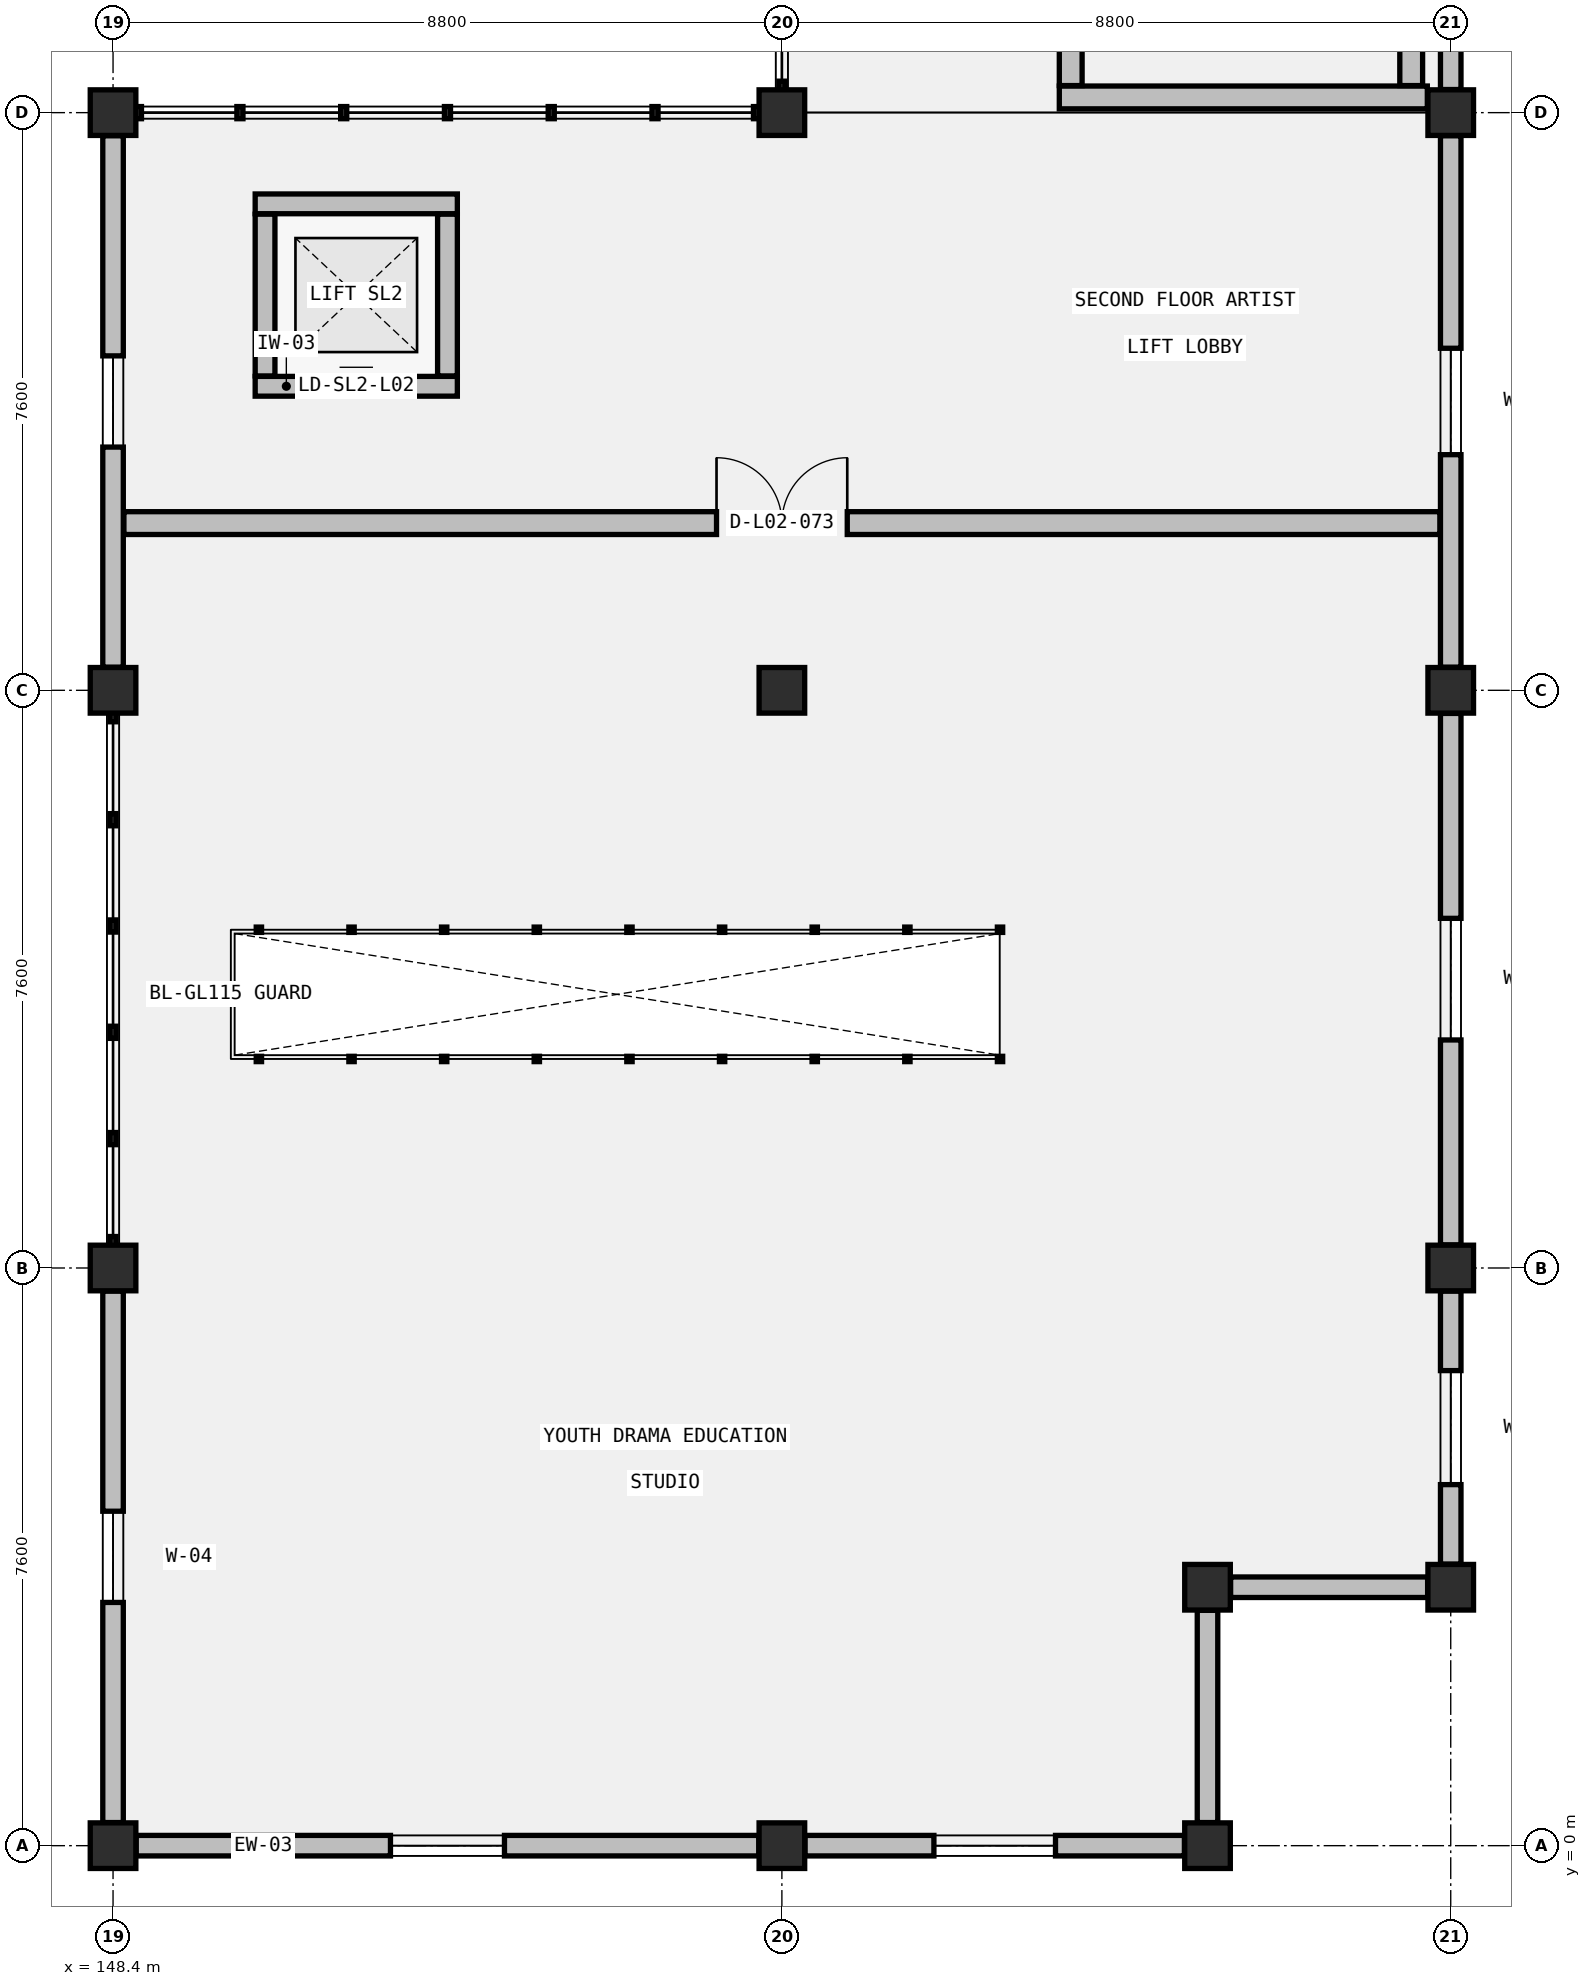
"""IFC4 building model, lengths in metres.
Left out: names, types, materials, properties, quantities, classifications, styles, units other than length and angle.
Written with IfcOpenShell. Run it as: python <this file> out.ifc"""

import sys

from ifc_helpers import new_model, si_unit, direction, frame, frame_2d, origin, origin_2d, place, context, subcontext, project, spatial, rectangle, extrude, element, fill, save


model = new_model("IFC4")
c1 = context("Model", 3, precision=1e-05, world=origin(), true_north=direction((0.0, 1.0)))
c2 = subcontext(c1, "Body", "Model", "MODEL_VIEW")
j1 = project(units=[si_unit("LENGTHUNIT", "METRE"), si_unit("PLANEANGLEUNIT", "RADIAN")], contexts=[c1])
p1 = place(None, origin())
s1 = spatial("IfcSite", under=j1, at=p1, CompositionType="ELEMENT")
p2 = place(p1, origin())
s2 = spatial("IfcBuilding", under=s1, at=p2, CompositionType="ELEMENT")
p3 = place(p2, frame((0.0, 0.0, 10.0)))
s3 = spatial("IfcBuildingStorey", under=s2, at=p3, CompositionType="ELEMENT", Elevation=10.0)
for number, where, z_axis, x_axis in (
    (1, (148.4, 0.0, 0.0), (0.0, 0.0, 1.0), (1.0, 0.0, 0.0)),
    (2, (148.4, 7.6, 0.0), (0.0, 0.0, 1.0), (1.0, 0.0, 0.0)),
    (3, (148.4, 15.2, 0.0), (0.0, 0.0, 1.0), (1.0, 0.0, 0.0)),
    (4, (148.4, 22.8, 0.0), (0.0, 0.0, 1.0), (1.0, 0.0, 0.0)),
    (5, (157.2, 0.0, 0.0), (0.0, 0.0, 1.0), (1.0, 0.0, 0.0)),
    (6, (157.2, 15.2, 0.0), (0.0, 0.0, 1.0), (1.0, 0.0, 0.0)),
    (7, (157.2, 22.8, 0.0), (0.0, 0.0, 1.0), (1.0, 0.0, 0.0)),
    (8, (166.0, 7.6, 0.0), (0.0, 0.0, 1.0), (1.0, 0.0, 0.0)),
    (9, (166.0, 15.2, 0.0), (0.0, 0.0, 1.0), (1.0, 0.0, 0.0)),
    (10, (166.0, 22.8, 0.0), (0.0, 0.0, 1.0), (1.0, 0.0, 0.0)),
    (11, (162.8, 0.0, 0.0), (0.0, 0.0, 1.0), (1.0, 0.0, 0.0)),
    (12, (162.8, 3.4, 0.0), (0.0, 0.0, 1.0), (1.0, 0.0, 0.0)),
    (13, (166.0, 3.4, 0.0), (0.0, 0.0, 1.0), (1.0, 0.0, 0.0)),
):
    element("IfcColumn", number, at=place(p3, frame(where, z_axis=z_axis, x_axis=x_axis)), inside=s3, PredefinedType="COLUMN", context=c2, shape_type="SweptSolid", body=[
        extrude(rectangle(XDim=0.6, YDim=0.6, at=origin_2d()), origin(), (0.0, 0.0, 1.0), 4.6),
    ])
p4 = place(p3, frame((166.0, 3.704, 0.0), z_axis=(0.0, 0.0, 1.0), x_axis=(0.0, 1.0, 0.0)))
e14 = element("IfcWall", 14, at=p4, inside=s3, PredefinedType="STANDARD", context=c2, shape_type="SweptSolid", body=[
    extrude(rectangle(XDim=3.592, YDim=0.27, at=frame_2d((1.796, 0.0))), origin(), (0.0, 0.0, 1.0), 4.034),
])
p5 = place(p4, frame((1.046, 0.0, 0.9)))
e15 = element("IfcOpeningElement", 15, at=p5, cuts=e14, PredefinedType="OPENING", context=c2, shape_type="SweptSolid", body=[
    extrude(rectangle(XDim=1.5, YDim=2.15, at=frame_2d((0.75, 1.075))), frame((0.0, 0.145, 0.0), z_axis=(0.0, -1.0, 0.0), x_axis=(1.0, 0.0, 0.0)), (0.0, 0.0, 1.0), 0.29),
])
p6 = place(p3, frame((166.0, 7.904, 0.0), z_axis=(0.0, 0.0, 1.0), x_axis=(0.0, 1.0, 0.0)))
e16 = element("IfcWall", 16, at=p6, inside=s3, PredefinedType="STANDARD", context=c2, shape_type="SweptSolid", body=[
    extrude(rectangle(XDim=6.992, YDim=0.27, at=frame_2d((3.496, 0.0))), origin(), (0.0, 0.0, 1.0), 4.034),
])
p7 = place(p6, frame((2.696, 0.0, 0.9)))
e17 = element("IfcOpeningElement", 17, at=p7, cuts=e16, PredefinedType="OPENING", context=c2, shape_type="SweptSolid", body=[
    extrude(rectangle(XDim=1.6, YDim=1.8, at=frame_2d((0.8, 0.9))), frame((0.0, 0.145, 0.0), z_axis=(0.0, -1.0, 0.0), x_axis=(1.0, 0.0, 0.0)), (0.0, 0.0, 1.0), 0.29),
])
p8 = place(p3, frame((166.0, 15.504, 0.0), z_axis=(0.0, 0.0, 1.0), x_axis=(0.0, 1.0, 0.0)))
e18 = element("IfcWall", 18, at=p8, inside=s3, PredefinedType="STANDARD", context=c2, shape_type="SweptSolid", body=[
    extrude(rectangle(XDim=6.992, YDim=0.27, at=frame_2d((3.496, 0.0))), origin(), (0.0, 0.0, 1.0), 4.034),
])
p9 = place(p8, frame((2.796, 0.0, 0.9)))
e19 = element("IfcOpeningElement", 19, at=p9, cuts=e18, PredefinedType="OPENING", context=c2, shape_type="SweptSolid", body=[
    extrude(rectangle(XDim=1.4, YDim=1.2, at=frame_2d((0.7, 0.6))), frame((0.0, 0.145, 0.0), z_axis=(0.0, -1.0, 0.0), x_axis=(1.0, 0.0, 0.0)), (0.0, 0.0, 1.0), 0.29),
])
p10 = place(p3, frame((166.0, 23.104, 0.0), z_axis=(0.0, 0.0, 1.0), x_axis=(0.0, 1.0, 0.0)))
e20 = element("IfcWall", 20, at=p10, inside=s3, PredefinedType="STANDARD", context=c2, shape_type="SweptSolid", body=[
    extrude(rectangle(XDim=6.992, YDim=0.27, at=frame_2d((3.496, 0.0))), origin(), (0.0, 0.0, 1.0), 4.034),
])
p11 = place(p10, frame((2.196, 0.0, 0.9)))
e21 = element("IfcOpeningElement", 21, at=p11, cuts=e20, PredefinedType="OPENING", context=c2, shape_type="SweptSolid", body=[
    extrude(rectangle(XDim=2.6, YDim=2.2, at=frame_2d((1.3, 1.1))), frame((0.0, 0.145, 0.0), z_axis=(0.0, -1.0, 0.0), x_axis=(1.0, 0.0, 0.0)), (0.0, 0.0, 1.0), 0.29),
])
p12 = place(p3, frame((148.704, 0.0, 0.0), z_axis=(0.0, 0.0, 1.0), x_axis=(1.0, 0.0, 0.0)))
e22 = element("IfcWall", 22, at=p12, inside=s3, PredefinedType="STANDARD", context=c2, shape_type="SweptSolid", body=[
    extrude(rectangle(XDim=8.192, YDim=0.27, at=frame_2d((4.096, 0.0))), origin(), (0.0, 0.0, 1.0), 3.888),
])
p13 = place(p12, frame((3.346, 0.0, 0.9)))
e23 = element("IfcOpeningElement", 23, at=p13, cuts=e22, PredefinedType="OPENING", context=c2, shape_type="SweptSolid", body=[
    extrude(rectangle(XDim=1.5, YDim=2.15, at=frame_2d((0.75, 1.075))), frame((0.0, 0.145, 0.0), z_axis=(0.0, -1.0, 0.0), x_axis=(1.0, 0.0, 0.0)), (0.0, 0.0, 1.0), 0.29),
])
p14 = place(p3, frame((157.504, 0.0, 0.0), z_axis=(0.0, 0.0, 1.0), x_axis=(1.0, 0.0, 0.0)))
e24 = element("IfcWall", 24, at=p14, inside=s3, PredefinedType="STANDARD", context=c2, shape_type="SweptSolid", body=[
    extrude(rectangle(XDim=4.992, YDim=0.27, at=frame_2d((2.496, 0.0))), origin(), (0.0, 0.0, 1.0), 3.888),
])
p15 = place(p14, frame((1.696, 0.0, 0.9)))
e25 = element("IfcOpeningElement", 25, at=p15, cuts=e24, PredefinedType="OPENING", context=c2, shape_type="SweptSolid", body=[
    extrude(rectangle(XDim=1.6, YDim=1.8, at=frame_2d((0.8, 0.9))), frame((0.0, 0.145, 0.0), z_axis=(0.0, -1.0, 0.0), x_axis=(1.0, 0.0, 0.0)), (0.0, 0.0, 1.0), 0.29),
])
p16 = place(p3, frame((162.8, 0.304, 0.0), z_axis=(0.0, 0.0, 1.0), x_axis=(0.0, 1.0, 0.0)))
e26 = element("IfcWall", 26, at=p16, inside=s3, PredefinedType="STANDARD", context=c2, shape_type="SweptSolid", body=[
    extrude(rectangle(XDim=2.792, YDim=0.27, at=frame_2d((1.396, 0.0))), origin(), (0.0, 0.0, 1.0), 4.034),
])
p17 = place(p3, frame((163.104, 3.4, 0.0), z_axis=(0.0, 0.0, 1.0), x_axis=(1.0, 0.0, 0.0)))
e27 = element("IfcWall", 27, at=p17, inside=s3, PredefinedType="STANDARD", context=c2, shape_type="SweptSolid", body=[
    extrude(rectangle(XDim=2.592, YDim=0.27, at=frame_2d((1.296, 0.0))), origin(), (0.0, 0.0, 1.0), 3.888),
])
p18 = place(p3, frame((148.4, 0.304, 0.0), z_axis=(0.0, 0.0, 1.0), x_axis=(0.0, 1.0, 0.0)))
e28 = element("IfcWall", 28, at=p18, inside=s3, PredefinedType="STANDARD", context=c2, shape_type="SweptSolid", body=[
    extrude(rectangle(XDim=6.992, YDim=0.27, at=frame_2d((3.496, 0.0))), origin(), (0.0, 0.0, 1.0), 4.034),
])
p19 = place(p18, frame((2.896, 0.0, 0.9)))
e29 = element("IfcOpeningElement", 29, at=p19, cuts=e28, PredefinedType="OPENING", context=c2, shape_type="SweptSolid", body=[
    extrude(rectangle(XDim=1.2, YDim=2.15, at=frame_2d((0.6, 1.075))), frame((0.0, 0.145, 0.0), z_axis=(0.0, -1.0, 0.0), x_axis=(1.0, 0.0, 0.0)), (0.0, 0.0, 1.0), 0.29),
])
p20 = place(p3, frame((148.4, 15.504, 0.0), z_axis=(0.0, 0.0, 1.0), x_axis=(0.0, 1.0, 0.0)))
e30 = element("IfcWall", 30, at=p20, inside=s3, PredefinedType="STANDARD", context=c2, shape_type="SweptSolid", body=[
    extrude(rectangle(XDim=6.992, YDim=0.27, at=frame_2d((3.496, 0.0))), origin(), (0.0, 0.0, 1.0), 4.034),
])
p21 = place(p20, frame((2.896, 0.0, 0.9)))
e31 = element("IfcOpeningElement", 31, at=p21, cuts=e30, PredefinedType="OPENING", context=c2, shape_type="SweptSolid", body=[
    extrude(rectangle(XDim=1.2, YDim=2.15, at=frame_2d((0.6, 1.075))), frame((0.0, 0.145, 0.0), z_axis=(0.0, -1.0, 0.0), x_axis=(1.0, 0.0, 0.0)), (0.0, 0.0, 1.0), 0.29),
])
p22 = place(p3, frame((150.27, 19.2, 0.0), z_axis=(0.0, 0.0, 1.0), x_axis=(1.0, 0.0, 0.0)))
e32 = element("IfcWall", 32, at=p22, inside=s3, PredefinedType="STANDARD", context=c2, shape_type="SweptSolid", body=[
    extrude(rectangle(XDim=2.66, YDim=0.26, at=frame_2d((1.33, 0.0))), origin(), (0.0, 0.0, 1.0), 3.728),
])
p23 = place(p22, frame((0.82, 0.0, 0.0)))
e33 = element("IfcOpeningElement", 33, at=p23, cuts=e32, PredefinedType="OPENING", context=c2, shape_type="SweptSolid", body=[
    extrude(rectangle(XDim=1.02, YDim=2.1, at=frame_2d((0.51, 1.05))), frame((0.0, 0.14, 0.0), z_axis=(0.0, -1.0, 0.0), x_axis=(1.0, 0.0, 0.0)), (0.0, 0.0, 1.0), 0.28),
])
p24 = place(p3, frame((150.27, 21.6, 0.0), z_axis=(0.0, 0.0, 1.0), x_axis=(1.0, 0.0, 0.0)))
e34 = element("IfcWall", 34, at=p24, inside=s3, PredefinedType="STANDARD", context=c2, shape_type="SweptSolid", body=[
    extrude(rectangle(XDim=2.66, YDim=0.26, at=frame_2d((1.33, 0.0))), origin(), (0.0, 0.0, 1.0), 3.728),
])
for number, where, z_axis, x_axis in (
    (35, (150.4, 19.336, 0.0), (0.0, 0.0, 1.0), (0.0, 1.0, 0.0)),
    (36, (152.8, 19.336, 0.0), (0.0, 0.0, 1.0), (0.0, 1.0, 0.0)),
):
    element("IfcWall", number, at=place(p3, frame(where, z_axis=z_axis, x_axis=x_axis)), inside=s3, PredefinedType="STANDARD", context=c2, shape_type="SweptSolid", body=[
        extrude(rectangle(XDim=2.128, YDim=0.26, at=frame_2d((1.064, 0.0))), origin(), (0.0, 0.0, 1.0), 3.728),
    ])
p25 = place(p3, frame((148.543, 17.4, 0.0), z_axis=(0.0, 0.0, 1.0), x_axis=(1.0, 0.0, 0.0)))
e37 = element("IfcWall", 37, at=p25, inside=s3, PredefinedType="PARTITIONING", context=c2, shape_type="SweptSolid", body=[
    extrude(rectangle(XDim=17.314, YDim=0.3, at=frame_2d((8.657, 0.0))), origin(), (0.0, 0.0, 1.0), 3.728),
])
p26 = place(p25, frame((7.797, 0.0, 0.0)))
e38 = element("IfcOpeningElement", 38, at=p26, cuts=e37, PredefinedType="OPENING", context=c2, shape_type="SweptSolid", body=[
    extrude(rectangle(XDim=1.72, YDim=2.38, at=frame_2d((0.86, 1.19))), frame((0.0, 0.16, 0.0), z_axis=(0.0, -1.0, 0.0), x_axis=(1.0, 0.0, 0.0)), (0.0, 0.0, 1.0), 0.32),
])
p27 = place(p3, frame((160.85, 23.0, 0.0), z_axis=(0.0, 0.0, 1.0), x_axis=(1.0, 0.0, 0.0)))
e39 = element("IfcWall", 39, at=p27, inside=s3, PredefinedType="PARTITIONING", context=c2, shape_type="SweptSolid", body=[
    extrude(rectangle(XDim=4.842, YDim=0.3, at=frame_2d((2.421, 0.0))), origin(), (0.0, 0.0, 1.0), 3.728),
])
p28 = place(p3, frame((161.0, 23.156, 0.0), z_axis=(0.0, 0.0, 1.0), x_axis=(0.0, 1.0, 0.0)))
e40 = element("IfcWall", 40, at=p28, inside=s3, PredefinedType="PARTITIONING", context=c2, shape_type="SweptSolid", body=[
    extrude(rectangle(XDim=29.488, YDim=0.3, at=frame_2d((14.744, 0.0))), origin(), (0.0, 0.0, 1.0), 3.888),
])
p29 = place(p28, frame((13.884, 0.0, 0.0)))
e41 = element("IfcOpeningElement", 41, at=p29, cuts=e40, PredefinedType="OPENING", context=c2, shape_type="SweptSolid", body=[
    extrude(rectangle(XDim=1.72, YDim=2.38, at=frame_2d((0.86, 1.19))), frame((0.0, 0.16, 0.0), z_axis=(0.0, -1.0, 0.0), x_axis=(1.0, 0.0, 0.0)), (0.0, 0.0, 1.0), 0.32),
])
p30 = place(p3, frame((165.48, 23.156, 0.0), z_axis=(0.0, 0.0, 1.0), x_axis=(0.0, 1.0, 0.0)))
e42 = element("IfcWall", 42, at=p30, inside=s3, PredefinedType="PARTITIONING", context=c2, shape_type="SweptSolid", body=[
    extrude(rectangle(XDim=29.488, YDim=0.3, at=frame_2d((14.744, 0.0))), origin(), (0.0, 0.0, 1.0), 3.888),
])
p31 = place(p5, origin())
e43 = element("IfcWindow", 43, at=p31, inside=s3, PartitioningType="DOUBLE_PANEL_VERTICAL", PredefinedType="WINDOW", context=c2, shape_type="SweptSolid", body=[
    extrude(rectangle(XDim=1.5, YDim=2.15, at=frame_2d((0.75, 1.075))), frame((0.0, 0.03, 0.0), z_axis=(0.0, -1.0, 0.0), x_axis=(1.0, 0.0, 0.0)), (0.0, 0.0, 1.0), 0.06),
])
fill(e15, e43)
p32 = place(p7, origin())
e44 = element("IfcWindow", 44, at=p32, inside=s3, PartitioningType="DOUBLE_PANEL_VERTICAL", PredefinedType="WINDOW", context=c2, shape_type="SweptSolid", body=[
    extrude(rectangle(XDim=1.6, YDim=1.8, at=frame_2d((0.8, 0.9))), frame((0.0, 0.03, 0.0), z_axis=(0.0, -1.0, 0.0), x_axis=(1.0, 0.0, 0.0)), (0.0, 0.0, 1.0), 0.06),
])
fill(e17, e44)
p33 = place(p9, origin())
e45 = element("IfcWindow", 45, at=p33, inside=s3, PartitioningType="SINGLE_PANEL", PredefinedType="WINDOW", context=c2, shape_type="SweptSolid", body=[
    extrude(rectangle(XDim=1.4, YDim=1.2, at=frame_2d((0.7, 0.6))), frame((0.0, 0.03, 0.0), z_axis=(0.0, -1.0, 0.0), x_axis=(1.0, 0.0, 0.0)), (0.0, 0.0, 1.0), 0.06),
])
fill(e19, e45)
p34 = place(p13, origin())
e46 = element("IfcWindow", 46, at=p34, inside=s3, PartitioningType="DOUBLE_PANEL_VERTICAL", PredefinedType="WINDOW", context=c2, shape_type="SweptSolid", body=[
    extrude(rectangle(XDim=1.5, YDim=2.15, at=frame_2d((0.75, 1.075))), frame((0.0, 0.03, 0.0), z_axis=(0.0, -1.0, 0.0), x_axis=(1.0, 0.0, 0.0)), (0.0, 0.0, 1.0), 0.06),
])
fill(e23, e46)
p35 = place(p15, origin())
e47 = element("IfcWindow", 47, at=p35, inside=s3, PartitioningType="DOUBLE_PANEL_VERTICAL", PredefinedType="WINDOW", context=c2, shape_type="SweptSolid", body=[
    extrude(rectangle(XDim=1.6, YDim=1.8, at=frame_2d((0.8, 0.9))), frame((0.0, 0.03, 0.0), z_axis=(0.0, -1.0, 0.0), x_axis=(1.0, 0.0, 0.0)), (0.0, 0.0, 1.0), 0.06),
])
fill(e25, e47)
p36 = place(p19, origin())
e48 = element("IfcWindow", 48, at=p36, inside=s3, PartitioningType="SINGLE_PANEL", PredefinedType="WINDOW", context=c2, shape_type="SweptSolid", body=[
    extrude(rectangle(XDim=1.2, YDim=2.15, at=frame_2d((0.6, 1.075))), frame((0.0, 0.03, 0.0), z_axis=(0.0, -1.0, 0.0), x_axis=(1.0, 0.0, 0.0)), (0.0, 0.0, 1.0), 0.06),
])
fill(e29, e48)
p37 = place(p21, origin())
e49 = element("IfcWindow", 49, at=p37, inside=s3, PartitioningType="SINGLE_PANEL", PredefinedType="WINDOW", context=c2, shape_type="SweptSolid", body=[
    extrude(rectangle(XDim=1.2, YDim=2.15, at=frame_2d((0.6, 1.075))), frame((0.0, 0.03, 0.0), z_axis=(0.0, -1.0, 0.0), x_axis=(1.0, 0.0, 0.0)), (0.0, 0.0, 1.0), 0.06),
])
fill(e31, e49)
p38 = place(p23, origin())
e50 = element("IfcDoor", 50, at=p38, inside=s3, OperationType="SLIDING_TO_RIGHT", PredefinedType="DOOR", context=c2, shape_type="SweptSolid", body=[
    extrude(rectangle(XDim=1.02, YDim=2.1, at=frame_2d((0.51, 1.05))), frame((0.0, 0.025, 0.0), z_axis=(0.0, -1.0, 0.0), x_axis=(1.0, 0.0, 0.0)), (0.0, 0.0, 1.0), 0.05),
])
fill(e33, e50)
p39 = place(p26, origin())
e51 = element("IfcDoor", 51, at=p39, inside=s3, OperationType="DOUBLE_DOOR_SINGLE_SWING", PredefinedType="DOOR", context=c2, shape_type="SweptSolid", body=[
    extrude(rectangle(XDim=1.72, YDim=2.38, at=frame_2d((0.86, 1.19))), frame((0.0, 0.025, 0.0), z_axis=(0.0, -1.0, 0.0), x_axis=(1.0, 0.0, 0.0)), (0.0, 0.0, 1.0), 0.05),
])
fill(e38, e51)
save(model, sys.argv[1])
